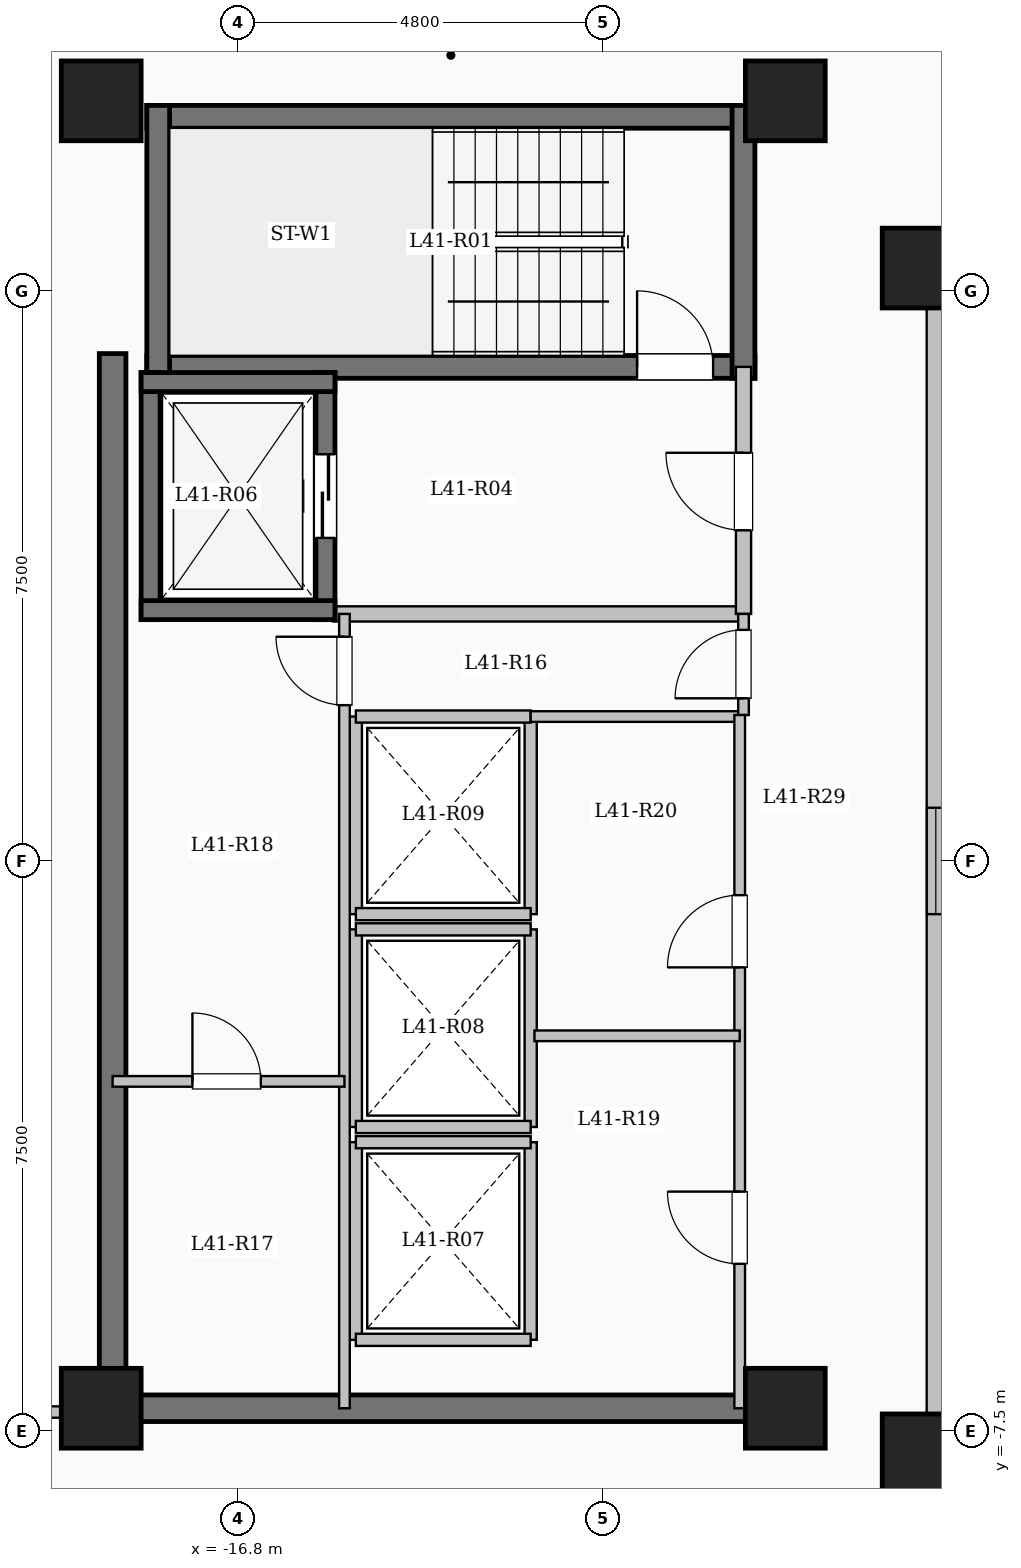
"""IFC4 building model, lengths in metres.
Left out: names, types, materials, properties, quantities, classifications, styles, units other than length and angle.
Written with IfcOpenShell. Run it as: python <this file> out.ifc"""

import sys

from ifc_helpers import new_model, si_unit, direction, frame, frame_2d, origin, origin_2d, place, context, subcontext, project, spatial, rectangle, extrude, element, fill, save


model = new_model("IFC4")
c1 = context("Model", 3, precision=1e-05, world=origin(), true_north=direction((0.0, 1.0)))
c2 = subcontext(c1, "Body", "Model", "MODEL_VIEW")
j1 = project(units=[si_unit("LENGTHUNIT", "METRE"), si_unit("PLANEANGLEUNIT", "RADIAN")], contexts=[c1])
p1 = place(None, origin())
s1 = spatial("IfcSite", under=j1, at=p1, CompositionType="ELEMENT")
p2 = place(p1, origin())
s2 = spatial("IfcBuilding", under=s1, at=p2, CompositionType="ELEMENT")
p3 = place(p2, frame((0.0, 0.0, 152.7)))
s3 = spatial("IfcBuildingStorey", under=s2, at=p3, CompositionType="ELEMENT", Elevation=152.7)
for number, where, z_axis, x_axis in (
    (1, (-7.8, -7.8, 0.0), (0.0, 0.0, 1.0), (1.0, 0.0, 0.0)),
    (2, (-7.8, 7.8, 0.0), (0.0, 0.0, 1.0), (1.0, 0.0, 0.0)),
    (3, (-9.6, -7.2, 0.0), (0.0, 0.0, 1.0), (1.0, 0.0, 0.0)),
    (4, (-9.6, 10.0, 0.0), (0.0, 0.0, 1.0), (1.0, 0.0, 0.0)),
    (5, (-18.6, -7.2, 0.0), (0.0, 0.0, 1.0), (1.0, 0.0, 0.0)),
    (6, (-18.6, 10.0, 0.0), (0.0, 0.0, 1.0), (1.0, 0.0, 0.0)),
):
    element("IfcColumn", number, at=place(p3, frame(where, z_axis=z_axis, x_axis=x_axis)), inside=s3, PredefinedType="COLUMN", context=c2, shape_type="SweptSolid", body=[
        extrude(rectangle(XDim=1.05, YDim=1.05, at=origin_2d()), origin(), (0.0, 0.0, 1.0), 3.35),
    ])
p4 = place(p3, frame((-7.62, -7.62, 0.0), z_axis=(0.0, 0.0, 1.0), x_axis=(1.0, 0.0, 0.0)))
e7 = element("IfcWall", 7, at=p4, inside=s3, PredefinedType="SOLIDWALL", context=c2, shape_type="SweptSolid", body=[
    extrude(rectangle(XDim=15.24, YDim=0.24, at=frame_2d((7.62, 0.0))), origin(), (0.0, 0.0, 1.0), 3.1),
])
p5 = place(p4, frame((6.92, 0.0, 0.95)))
e8 = element("IfcOpeningElement", 8, at=p5, cuts=e7, PredefinedType="OPENING", context=c2, shape_type="SweptSolid", body=[
    extrude(rectangle(XDim=1.4, YDim=1.5, at=frame_2d((0.7, 0.75))), frame((0.0, 0.13, 0.0), z_axis=(0.0, -1.0, 0.0), x_axis=(1.0, 0.0, 0.0)), (0.0, 0.0, 1.0), 0.26),
])
p6 = place(p3, frame((7.62, 7.62, 0.0), z_axis=(0.0, 0.0, 1.0), x_axis=(-1.0, 0.0, 0.0)))
e9 = element("IfcWall", 9, at=p6, inside=s3, PredefinedType="SOLIDWALL", context=c2, shape_type="SweptSolid", body=[
    extrude(rectangle(XDim=15.24, YDim=0.24, at=frame_2d((7.62, 0.0))), origin(), (0.0, 0.0, 1.0), 3.1),
])
p7 = place(p6, frame((6.92, 0.0, 0.95)))
e10 = element("IfcOpeningElement", 10, at=p7, cuts=e9, PredefinedType="OPENING", context=c2, shape_type="SweptSolid", body=[
    extrude(rectangle(XDim=1.4, YDim=1.5, at=frame_2d((0.7, 0.75))), frame((0.0, 0.13, 0.0), z_axis=(0.0, -1.0, 0.0), x_axis=(1.0, 0.0, 0.0)), (0.0, 0.0, 1.0), 0.26),
])
p8 = place(p3, frame((-7.62, 7.62, 0.0), z_axis=(0.0, 0.0, 1.0), x_axis=(0.0, -1.0, 0.0)))
e11 = element("IfcWall", 11, at=p8, inside=s3, PredefinedType="SOLIDWALL", context=c2, shape_type="SweptSolid", body=[
    extrude(rectangle(XDim=15.24, YDim=0.24, at=frame_2d((7.62, 0.0))), origin(), (0.0, 0.0, 1.0), 3.1),
])
p9 = place(p8, frame((6.92, 0.0, 0.95)))
e12 = element("IfcOpeningElement", 12, at=p9, cuts=e11, PredefinedType="OPENING", context=c2, shape_type="SweptSolid", body=[
    extrude(rectangle(XDim=1.4, YDim=1.5, at=frame_2d((0.7, 0.75))), frame((0.0, 0.13, 0.0), z_axis=(0.0, -1.0, 0.0), x_axis=(1.0, 0.0, 0.0)), (0.0, 0.0, 1.0), 0.26),
])
p10 = place(p3, frame((-18.0, 9.79, 0.0), z_axis=(0.0, 0.0, 1.0), x_axis=(1.0, 0.0, 0.0)))
e13 = element("IfcWall", 13, at=p10, inside=s3, PredefinedType="SHEAR", context=c2, shape_type="SweptSolid", body=[
    extrude(rectangle(XDim=8.0, YDim=0.3, at=frame_2d((4.0, 0.0))), origin(), (0.0, 0.0, 1.0), 3.35),
])
p11 = place(p3, frame((-18.0, 6.5, 0.0), z_axis=(0.0, 0.0, 1.0), x_axis=(1.0, 0.0, 0.0)))
e14 = element("IfcWall", 14, at=p11, inside=s3, PredefinedType="SHEAR", context=c2, shape_type="SweptSolid", body=[
    extrude(rectangle(XDim=8.0, YDim=0.3, at=frame_2d((4.0, 0.0))), origin(), (0.0, 0.0, 1.0), 3.35),
])
p12 = place(p11, frame((6.45, 0.0, 0.0)))
e15 = element("IfcOpeningElement", 15, at=p12, cuts=e14, PredefinedType="OPENING", context=c2, shape_type="SweptSolid", body=[
    extrude(rectangle(XDim=1.0, YDim=2.15, at=frame_2d((0.5, 1.075))), frame((0.0, 0.16, 0.0), z_axis=(0.0, -1.0, 0.0), x_axis=(1.0, 0.0, 0.0)), (0.0, 0.0, 1.0), 0.32),
])
for number, where, z_axis, x_axis in (
    (16, (-17.85, 6.35, 0.0), (0.0, 0.0, 1.0), (0.0, 1.0, 0.0)),
    (17, (-10.15, 6.35, 0.0), (0.0, 0.0, 1.0), (0.0, 1.0, 0.0)),
):
    element("IfcWall", number, at=place(p3, frame(where, z_axis=z_axis, x_axis=x_axis)), inside=s3, PredefinedType="SHEAR", context=c2, shape_type="SweptSolid", body=[
        extrude(rectangle(XDim=3.59, YDim=0.3, at=frame_2d((1.795, 0.0))), origin(), (0.0, 0.0, 1.0), 3.35),
    ])
p13 = place(p3, frame((-15.55, 3.25, 0.0), z_axis=(0.0, 0.0, 1.0), x_axis=(1.0, 0.0, 0.0)))
e18 = element("IfcWall", 18, at=p13, inside=s3, PredefinedType="SOLIDWALL", context=c2, shape_type="SweptSolid", body=[
    extrude(rectangle(XDim=5.4, YDim=0.2, at=frame_2d((2.7, 0.0))), origin(), (0.0, 0.0, 1.0), 3.1),
])
p14 = place(p3, frame((-10.15, 3.25, 0.0), z_axis=(0.0, 0.0, 1.0), x_axis=(0.0, 1.0, 0.0)))
e19 = element("IfcWall", 19, at=p14, inside=s3, PredefinedType="SOLIDWALL", context=c2, shape_type="SweptSolid", body=[
    extrude(rectangle(XDim=3.25, YDim=0.2, at=frame_2d((1.625, 0.0))), origin(), (0.0, 0.0, 1.0), 3.1),
])
p15 = place(p14, frame((1.1, 0.0, 0.0)))
e20 = element("IfcOpeningElement", 20, at=p15, cuts=e19, PredefinedType="OPENING", context=c2, shape_type="SweptSolid", body=[
    extrude(rectangle(XDim=1.02, YDim=2.15, at=frame_2d((0.51, 1.075))), frame((0.0, 0.11, 0.0), z_axis=(0.0, -1.0, 0.0), x_axis=(1.0, 0.0, 0.0)), (0.0, 0.0, 1.0), 0.22),
])
p16 = place(p3, frame((-17.95, 3.175, 0.0), z_axis=(0.0, 0.0, 1.0), x_axis=(0.0, 1.0, 0.0)))
e21 = element("IfcWall", 21, at=p16, inside=s3, PredefinedType="SHEAR", context=c2, shape_type="SweptSolid", body=[
    extrude(rectangle(XDim=3.25, YDim=0.25, at=frame_2d((1.625, 0.0))), origin(), (0.0, 0.0, 1.0), 3.35),
])
p17 = place(p3, frame((-15.65, 3.175, 0.0), z_axis=(0.0, 0.0, 1.0), x_axis=(0.0, 1.0, 0.0)))
e22 = element("IfcWall", 22, at=p17, inside=s3, PredefinedType="SHEAR", context=c2, shape_type="SweptSolid", body=[
    extrude(rectangle(XDim=3.25, YDim=0.25, at=frame_2d((1.625, 0.0))), origin(), (0.0, 0.0, 1.0), 3.35),
])
p18 = place(p17, frame((1.075, 0.0, 0.0)))
e23 = element("IfcOpeningElement", 23, at=p18, cuts=e22, PredefinedType="OPENING", context=c2, shape_type="SweptSolid", body=[
    extrude(rectangle(XDim=1.1, YDim=2.15, at=frame_2d((0.55, 1.075))), frame((0.0, 0.135, 0.0), z_axis=(0.0, -1.0, 0.0), x_axis=(1.0, 0.0, 0.0)), (0.0, 0.0, 1.0), 0.27),
])
for number, where, z_axis, x_axis in (
    (24, (-18.075, 3.3, 0.0), (0.0, 0.0, 1.0), (1.0, 0.0, 0.0)),
    (25, (-18.075, 6.3, 0.0), (0.0, 0.0, 1.0), (1.0, 0.0, 0.0)),
):
    element("IfcWall", number, at=place(p3, frame(where, z_axis=z_axis, x_axis=x_axis)), inside=s3, PredefinedType="SHEAR", context=c2, shape_type="SweptSolid", body=[
        extrude(rectangle(XDim=2.55, YDim=0.25, at=frame_2d((1.275, 0.0))), origin(), (0.0, 0.0, 1.0), 3.35),
    ])
for number, where, z_axis, x_axis in (
    (26, (-15.25, -6.3, 0.0), (0.0, 0.0, 1.0), (0.0, 1.0, 0.0)),
    (27, (-12.95, -6.3, 0.0), (0.0, 0.0, 1.0), (0.0, 1.0, 0.0)),
):
    element("IfcWall", number, at=place(p3, frame(where, z_axis=z_axis, x_axis=x_axis)), inside=s3, PredefinedType="SOLIDWALL", context=c2, shape_type="SweptSolid", body=[
        extrude(rectangle(XDim=2.6, YDim=0.16, at=frame_2d((1.3, 0.0))), origin(), (0.0, 0.0, 1.0), 3.1),
    ])
for number, where, z_axis, x_axis in (
    (28, (-15.25, -6.3, 0.0), (0.0, 0.0, 1.0), (1.0, 0.0, 0.0)),
    (29, (-15.25, -3.7, 0.0), (0.0, 0.0, 1.0), (1.0, 0.0, 0.0)),
):
    element("IfcWall", number, at=place(p3, frame(where, z_axis=z_axis, x_axis=x_axis)), inside=s3, PredefinedType="SOLIDWALL", context=c2, shape_type="SweptSolid", body=[
        extrude(rectangle(XDim=2.3, YDim=0.16, at=frame_2d((1.15, 0.0))), origin(), (0.0, 0.0, 1.0), 3.1),
    ])
for number, where, z_axis, x_axis in (
    (30, (-15.25, -3.5, 0.0), (0.0, 0.0, 1.0), (0.0, 1.0, 0.0)),
    (31, (-12.95, -3.5, 0.0), (0.0, 0.0, 1.0), (0.0, 1.0, 0.0)),
):
    element("IfcWall", number, at=place(p3, frame(where, z_axis=z_axis, x_axis=x_axis)), inside=s3, PredefinedType="SOLIDWALL", context=c2, shape_type="SweptSolid", body=[
        extrude(rectangle(XDim=2.6, YDim=0.16, at=frame_2d((1.3, 0.0))), origin(), (0.0, 0.0, 1.0), 3.1),
    ])
for number, where, z_axis, x_axis in (
    (32, (-15.25, -3.5, 0.0), (0.0, 0.0, 1.0), (1.0, 0.0, 0.0)),
    (33, (-15.25, -0.9, 0.0), (0.0, 0.0, 1.0), (1.0, 0.0, 0.0)),
):
    element("IfcWall", number, at=place(p3, frame(where, z_axis=z_axis, x_axis=x_axis)), inside=s3, PredefinedType="SOLIDWALL", context=c2, shape_type="SweptSolid", body=[
        extrude(rectangle(XDim=2.3, YDim=0.16, at=frame_2d((1.15, 0.0))), origin(), (0.0, 0.0, 1.0), 3.1),
    ])
for number, where, z_axis, x_axis in (
    (34, (-15.25, -0.7, 0.0), (0.0, 0.0, 1.0), (0.0, 1.0, 0.0)),
    (35, (-12.95, -0.7, 0.0), (0.0, 0.0, 1.0), (0.0, 1.0, 0.0)),
):
    element("IfcWall", number, at=place(p3, frame(where, z_axis=z_axis, x_axis=x_axis)), inside=s3, PredefinedType="SOLIDWALL", context=c2, shape_type="SweptSolid", body=[
        extrude(rectangle(XDim=2.6, YDim=0.16, at=frame_2d((1.3, 0.0))), origin(), (0.0, 0.0, 1.0), 3.1),
    ])
for number, where, z_axis, x_axis in (
    (36, (-15.25, -0.7, 0.0), (0.0, 0.0, 1.0), (1.0, 0.0, 0.0)),
    (37, (-15.25, 1.9, 0.0), (0.0, 0.0, 1.0), (1.0, 0.0, 0.0)),
):
    element("IfcWall", number, at=place(p3, frame(where, z_axis=z_axis, x_axis=x_axis)), inside=s3, PredefinedType="SOLIDWALL", context=c2, shape_type="SweptSolid", body=[
        extrude(rectangle(XDim=2.3, YDim=0.16, at=frame_2d((1.15, 0.0))), origin(), (0.0, 0.0, 1.0), 3.1),
    ])
p19 = place(p3, frame((-18.45, -7.375, 0.0), z_axis=(0.0, 0.0, 1.0), x_axis=(0.0, 1.0, 0.0)))
e38 = element("IfcWall", 38, at=p19, inside=s3, PredefinedType="SHEAR", context=c2, shape_type="SweptSolid", body=[
    extrude(rectangle(XDim=14.05, YDim=0.35, at=frame_2d((7.025, 0.0))), origin(), (0.0, 0.0, 1.0), 3.35),
])
p20 = place(p3, frame((-18.625, -7.2, 0.0), z_axis=(0.0, 0.0, 1.0), x_axis=(1.0, 0.0, 0.0)))
e39 = element("IfcWall", 39, at=p20, inside=s3, PredefinedType="SHEAR", context=c2, shape_type="SweptSolid", body=[
    extrude(rectangle(XDim=8.55, YDim=0.35, at=frame_2d((4.275, 0.0))), origin(), (0.0, 0.0, 1.0), 3.35),
])
p21 = place(p3, frame((-12.95, 1.9, 0.0), z_axis=(0.0, 0.0, 1.0), x_axis=(1.0, 0.0, 0.0)))
e40 = element("IfcWall", 40, at=p21, inside=s3, PredefinedType="PARTITIONING", context=c2, shape_type="SweptSolid", body=[
    extrude(rectangle(XDim=2.8, YDim=0.14, at=frame_2d((1.4, 0.0))), origin(), (0.0, 0.0, 1.0), 3.1),
])
p22 = place(p3, frame((-10.15, 1.92, 0.0), z_axis=(0.0, 0.0, 1.0), x_axis=(0.0, 1.0, 0.0)))
e41 = element("IfcWall", 41, at=p22, inside=s3, PredefinedType="PARTITIONING", context=c2, shape_type="SweptSolid", body=[
    extrude(rectangle(XDim=1.33, YDim=0.14, at=frame_2d((0.665, 0.0))), origin(), (0.0, 0.0, 1.0), 3.1),
])
p23 = place(p22, frame((0.22, 0.0, 0.0)))
e42 = element("IfcOpeningElement", 42, at=p23, cuts=e41, PredefinedType="OPENING", context=c2, shape_type="SweptSolid", body=[
    extrude(rectangle(XDim=0.9, YDim=2.08, at=frame_2d((0.45, 1.04))), frame((0.0, 0.08, 0.0), z_axis=(0.0, -1.0, 0.0), x_axis=(1.0, 0.0, 0.0)), (0.0, 0.0, 1.0), 0.16),
])
p24 = place(p3, frame((-15.4, -7.2, 0.0), z_axis=(0.0, 0.0, 1.0), x_axis=(0.0, 1.0, 0.0)))
e43 = element("IfcWall", 43, at=p24, inside=s3, PredefinedType="PARTITIONING", context=c2, shape_type="SweptSolid", body=[
    extrude(rectangle(XDim=10.45, YDim=0.14, at=frame_2d((5.225, 0.0))), origin(), (0.0, 0.0, 1.0), 3.1),
])
p25 = place(p24, frame((9.25, 0.0, 0.0)))
e44 = element("IfcOpeningElement", 44, at=p25, cuts=e43, PredefinedType="OPENING", context=c2, shape_type="SweptSolid", body=[
    extrude(rectangle(XDim=0.9, YDim=2.08, at=frame_2d((0.45, 1.04))), frame((0.0, 0.08, 0.0), z_axis=(0.0, -1.0, 0.0), x_axis=(1.0, 0.0, 0.0)), (0.0, 0.0, 1.0), 0.16),
])
p26 = place(p3, frame((-18.45, -2.9, 0.0), z_axis=(0.0, 0.0, 1.0), x_axis=(1.0, 0.0, 0.0)))
e45 = element("IfcWall", 45, at=p26, inside=s3, PredefinedType="PARTITIONING", context=c2, shape_type="SweptSolid", body=[
    extrude(rectangle(XDim=3.05, YDim=0.14, at=frame_2d((1.525, 0.0))), origin(), (0.0, 0.0, 1.0), 3.1),
])
p27 = place(p26, frame((1.05, 0.0, 0.0)))
e46 = element("IfcOpeningElement", 46, at=p27, cuts=e45, PredefinedType="OPENING", context=c2, shape_type="SweptSolid", body=[
    extrude(rectangle(XDim=0.9, YDim=2.08, at=frame_2d((0.45, 1.04))), frame((0.0, 0.08, 0.0), z_axis=(0.0, -1.0, 0.0), x_axis=(1.0, 0.0, 0.0)), (0.0, 0.0, 1.0), 0.16),
])
p28 = place(p3, frame((-10.2, -7.2, 0.0), z_axis=(0.0, 0.0, 1.0), x_axis=(0.0, 1.0, 0.0)))
e47 = element("IfcWall", 47, at=p28, inside=s3, PredefinedType="PARTITIONING", context=c2, shape_type="SweptSolid", body=[
    extrude(rectangle(XDim=9.12, YDim=0.14, at=frame_2d((4.56, 0.0))), origin(), (0.0, 0.0, 1.0), 3.1),
])
p29 = place(p28, frame((1.9, 0.0, 0.0)))
e48 = element("IfcOpeningElement", 48, at=p29, cuts=e47, PredefinedType="OPENING", context=c2, shape_type="SweptSolid", body=[
    extrude(rectangle(XDim=0.95, YDim=2.12, at=frame_2d((0.475, 1.06))), frame((0.0, 0.08, 0.0), z_axis=(0.0, -1.0, 0.0), x_axis=(1.0, 0.0, 0.0)), (0.0, 0.0, 1.0), 0.16),
])
p30 = place(p28, frame((5.8, 0.0, 0.0)))
e49 = element("IfcOpeningElement", 49, at=p30, cuts=e47, PredefinedType="OPENING", context=c2, shape_type="SweptSolid", body=[
    extrude(rectangle(XDim=0.95, YDim=2.12, at=frame_2d((0.475, 1.06))), frame((0.0, 0.08, 0.0), z_axis=(0.0, -1.0, 0.0), x_axis=(1.0, 0.0, 0.0)), (0.0, 0.0, 1.0), 0.16),
])
p31 = place(p3, frame((-12.9, -2.3, 0.0), z_axis=(0.0, 0.0, 1.0), x_axis=(1.0, 0.0, 0.0)))
e50 = element("IfcWall", 50, at=p31, inside=s3, PredefinedType="PARTITIONING", context=c2, shape_type="SweptSolid", body=[
    extrude(rectangle(XDim=2.7, YDim=0.14, at=frame_2d((1.35, 0.0))), origin(), (0.0, 0.0, 1.0), 3.1),
])
p32 = place(p3, frame((-25.08, -7.25, 0.0), z_axis=(0.0, 0.0, 1.0), x_axis=(1.0, 0.0, 0.0)))
e51 = element("IfcWall", 51, at=p32, inside=s3, PredefinedType="PARTITIONING", context=c2, shape_type="SweptSolid", body=[
    extrude(rectangle(XDim=6.63, YDim=0.15, at=frame_2d((3.315, 0.0))), origin(), (0.0, 0.0, 1.0), 3.1),
])
p33 = place(p32, frame((3.58, 0.0, 0.0)))
e52 = element("IfcOpeningElement", 52, at=p33, cuts=e51, PredefinedType="OPENING", context=c2, shape_type="SweptSolid", body=[
    extrude(rectangle(XDim=1.08, YDim=2.15, at=frame_2d((0.54, 1.075))), frame((0.0, 0.085, 0.0), z_axis=(0.0, -1.0, 0.0), x_axis=(1.0, 0.0, 0.0)), (0.0, 0.0, 1.0), 0.17),
])
p34 = place(p9, origin())
e53 = element("IfcWindow", 53, at=p34, inside=s3, PartitioningType="SINGLE_PANEL", PredefinedType="WINDOW", context=c2, shape_type="SweptSolid", body=[
    extrude(rectangle(XDim=1.4, YDim=1.5, at=frame_2d((0.7, 0.75))), frame((0.0, 0.03, 0.0), z_axis=(0.0, -1.0, 0.0), x_axis=(1.0, 0.0, 0.0)), (0.0, 0.0, 1.0), 0.06),
])
fill(e12, e53)
p35 = place(p12, origin())
e54 = element("IfcDoor", 54, at=p35, inside=s3, OperationType="SINGLE_SWING_LEFT", PredefinedType="DOOR", context=c2, shape_type="SweptSolid", body=[
    extrude(rectangle(XDim=1.0, YDim=2.15, at=frame_2d((0.5, 1.075))), frame((0.0, 0.025, 0.0), z_axis=(0.0, -1.0, 0.0), x_axis=(1.0, 0.0, 0.0)), (0.0, 0.0, 1.0), 0.05),
])
fill(e15, e54)
p36 = place(p15, origin())
e55 = element("IfcDoor", 55, at=p36, inside=s3, OperationType="SINGLE_SWING_RIGHT", PredefinedType="DOOR", context=c2, shape_type="SweptSolid", body=[
    extrude(rectangle(XDim=1.02, YDim=2.15, at=frame_2d((0.51, 1.075))), frame((0.0, 0.025, 0.0), z_axis=(0.0, -1.0, 0.0), x_axis=(1.0, 0.0, 0.0)), (0.0, 0.0, 1.0), 0.05),
])
fill(e20, e55)
p37 = place(p18, origin())
e56 = element("IfcDoor", 56, at=p37, inside=s3, OperationType="SLIDING_TO_LEFT", PredefinedType="DOOR", context=c2, shape_type="SweptSolid", body=[
    extrude(rectangle(XDim=1.1, YDim=2.15, at=frame_2d((0.55, 1.075))), frame((0.0, 0.025, 0.0), z_axis=(0.0, -1.0, 0.0), x_axis=(1.0, 0.0, 0.0)), (0.0, 0.0, 1.0), 0.05),
])
fill(e23, e56)
p38 = place(p23, origin())
e57 = element("IfcDoor", 57, at=p38, inside=s3, OperationType="SINGLE_SWING_LEFT", PredefinedType="DOOR", context=c2, shape_type="SweptSolid", body=[
    extrude(rectangle(XDim=0.9, YDim=2.08, at=frame_2d((0.45, 1.04))), frame((0.0, 0.025, 0.0), z_axis=(0.0, -1.0, 0.0), x_axis=(1.0, 0.0, 0.0)), (0.0, 0.0, 1.0), 0.05),
])
fill(e42, e57)
p39 = place(p25, origin())
e58 = element("IfcDoor", 58, at=p39, inside=s3, OperationType="SINGLE_SWING_RIGHT", PredefinedType="DOOR", context=c2, shape_type="SweptSolid", body=[
    extrude(rectangle(XDim=0.9, YDim=2.08, at=frame_2d((0.45, 1.04))), frame((0.0, 0.025, 0.0), z_axis=(0.0, -1.0, 0.0), x_axis=(1.0, 0.0, 0.0)), (0.0, 0.0, 1.0), 0.05),
])
fill(e44, e58)
p40 = place(p27, origin())
e59 = element("IfcDoor", 59, at=p40, inside=s3, OperationType="SINGLE_SWING_LEFT", PredefinedType="DOOR", context=c2, shape_type="SweptSolid", body=[
    extrude(rectangle(XDim=0.9, YDim=2.08, at=frame_2d((0.45, 1.04))), frame((0.0, 0.025, 0.0), z_axis=(0.0, -1.0, 0.0), x_axis=(1.0, 0.0, 0.0)), (0.0, 0.0, 1.0), 0.05),
])
fill(e46, e59)
p41 = place(p29, origin())
e60 = element("IfcDoor", 60, at=p41, inside=s3, OperationType="SINGLE_SWING_RIGHT", PredefinedType="DOOR", context=c2, shape_type="SweptSolid", body=[
    extrude(rectangle(XDim=0.95, YDim=2.12, at=frame_2d((0.475, 1.06))), frame((0.0, 0.025, 0.0), z_axis=(0.0, -1.0, 0.0), x_axis=(1.0, 0.0, 0.0)), (0.0, 0.0, 1.0), 0.05),
])
fill(e48, e60)
p42 = place(p30, origin())
e61 = element("IfcDoor", 61, at=p42, inside=s3, OperationType="SINGLE_SWING_LEFT", PredefinedType="DOOR", context=c2, shape_type="SweptSolid", body=[
    extrude(rectangle(XDim=0.95, YDim=2.12, at=frame_2d((0.475, 1.06))), frame((0.0, 0.025, 0.0), z_axis=(0.0, -1.0, 0.0), x_axis=(1.0, 0.0, 0.0)), (0.0, 0.0, 1.0), 0.05),
])
fill(e49, e61)
save(model, sys.argv[1])
